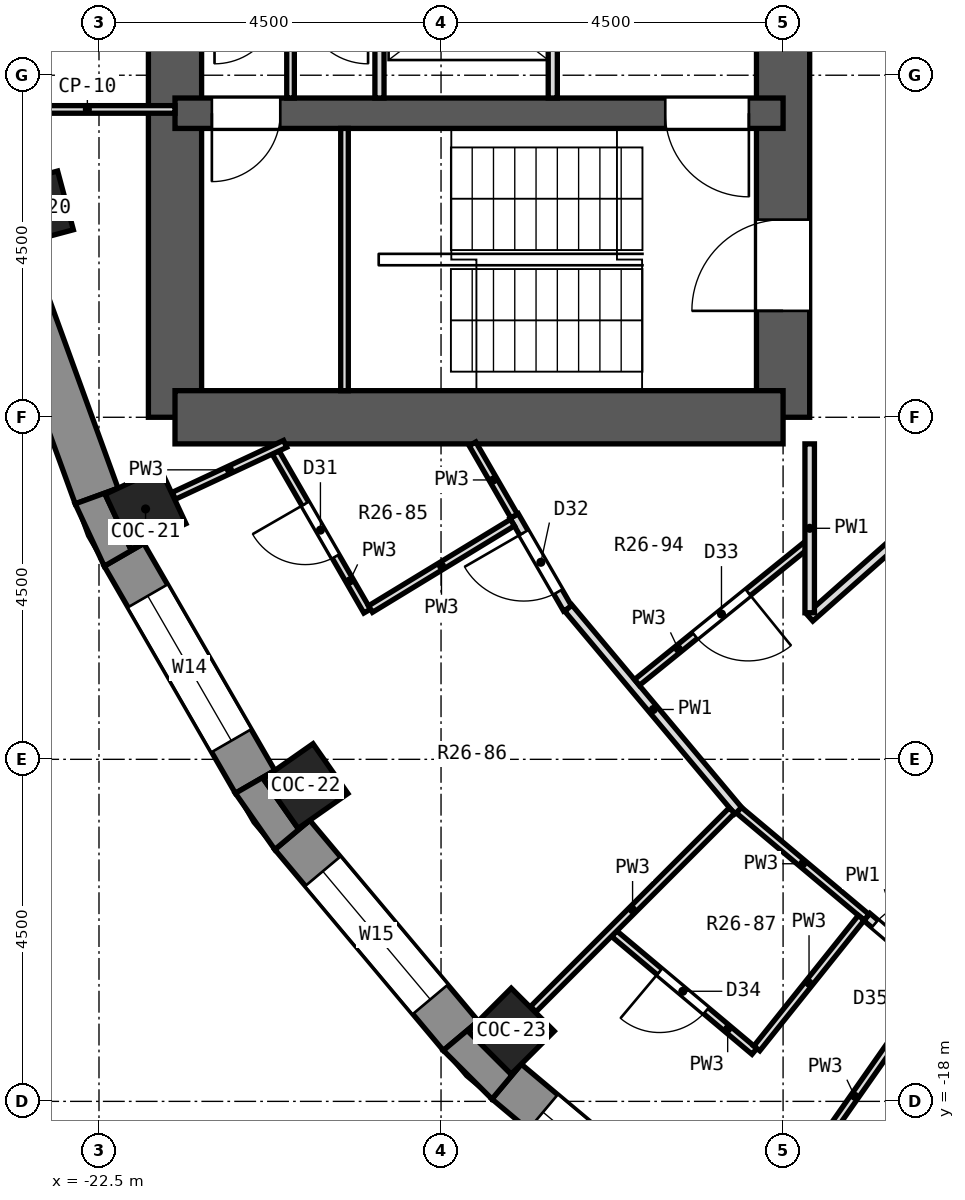
"""IFC4 building model, lengths in metres.
Left out: names, types, materials, properties, quantities, classifications, styles, units other than length and angle.
Written with IfcOpenShell. Run it as: python <this file> out.ifc"""

import sys

from ifc_helpers import new_model, si_unit, direction, frame, frame_2d, origin, origin_2d, place, context, subcontext, project, spatial, polyline, rectangle, outline, extrude, element, fill, save


model = new_model("IFC4")
c1 = context("Model", 3, precision=1e-05, world=origin(), true_north=direction((0.0, 1.0)))
c2 = subcontext(c1, "Body", "Model", "MODEL_VIEW")
j1 = project(units=[si_unit("LENGTHUNIT", "METRE"), si_unit("PLANEANGLEUNIT", "RADIAN")], contexts=[c1])
p1 = place(None, origin())
s1 = spatial("IfcSite", under=j1, at=p1, CompositionType="ELEMENT")
p2 = place(p1, origin())
s2 = spatial("IfcBuilding", under=s1, at=p2, CompositionType="ELEMENT")
p3 = place(p2, frame((0.0, 0.0, 170.7)))
s3 = spatial("IfcBuildingStorey", under=s2, at=p3, CompositionType="ELEMENT", Elevation=170.7)
for number, where, z_axis, x_axis in (
    (1, (-23.327, -6.25, 0.0), (0.0, 0.0, 1.0), (-0.966, -0.259, 0.0)),
    (2, (-21.887, -10.206, 0.0), (0.0, 0.0, 1.0), (-0.906, -0.423, 0.0)),
    (3, (-19.782, -13.852, 0.0), (0.0, 0.0, 1.0), (-0.819, -0.574, 0.0)),
    (4, (-17.077, -17.077, 0.0), (0.0, 0.0, 1.0), (-0.707, -0.707, 0.0)),
):
    element("IfcColumn", number, at=place(p3, frame(where, z_axis=z_axis, x_axis=x_axis)), inside=s3, PredefinedType="COLUMN", context=c2, shape_type="SweptSolid", body=[
        extrude(rectangle(XDim=0.8, YDim=0.8, at=origin_2d()), origin(), (0.0, 0.0, 1.0), 3.3),
    ])
p4 = place(p3, frame((-13.5, -9.0, 0.0), z_axis=(0.0, 0.0, 1.0), x_axis=(0.0, 1.0, 0.0)))
e5 = element("IfcWall", 5, at=p4, inside=s3, PredefinedType="SHEAR", context=c2, shape_type="SweptSolid", body=[
    extrude(rectangle(XDim=18.0, YDim=0.7, at=frame_2d((9.0, 0.0))), origin(), (0.0, 0.0, 1.0), 3.3),
])
p5 = place(p4, frame((15.4, 0.0, 0.0)))
e6 = element("IfcOpeningElement", 6, at=p5, cuts=e5, PredefinedType="OPENING", context=c2, shape_type="SweptSolid", body=[
    extrude(rectangle(XDim=1.2, YDim=2.1, at=frame_2d((0.6, 1.05))), frame((0.0, 0.362, 0.0), z_axis=(0.0, -1.0, 0.0), x_axis=(1.0, 0.0, 0.0)), (0.0, 0.0, 1.0), 0.724),
])
p6 = place(p4, frame((1.4, 0.0, 0.0)))
e7 = element("IfcOpeningElement", 7, at=p6, cuts=e5, PredefinedType="OPENING", context=c2, shape_type="SweptSolid", body=[
    extrude(rectangle(XDim=1.2, YDim=2.1, at=frame_2d((0.6, 1.05))), frame((0.0, 0.362, 0.0), z_axis=(0.0, -1.0, 0.0), x_axis=(1.0, 0.0, 0.0)), (0.0, 0.0, 1.0), 0.724),
])
p7 = place(p4, frame((7.5, 0.0, 0.0)))
e8 = element("IfcOpeningElement", 8, at=p7, cuts=e5, PredefinedType="OPENING", context=c2, shape_type="SweptSolid", body=[
    extrude(rectangle(XDim=3.0, YDim=2.4, at=frame_2d((1.5, 1.2))), frame((0.0, 0.362, 0.0), z_axis=(0.0, -1.0, 0.0), x_axis=(1.0, 0.0, 0.0)), (0.0, 0.0, 1.0), 0.724),
])
p8 = place(p3, frame((-21.5, -9.0, 0.0), z_axis=(0.0, 0.0, 1.0), x_axis=(0.0, 1.0, 0.0)))
e9 = element("IfcWall", 9, at=p8, inside=s3, PredefinedType="SHEAR", context=c2, shape_type="SweptSolid", body=[
    extrude(rectangle(XDim=18.0, YDim=0.7, at=frame_2d((9.0, 0.0))), origin(), (0.0, 0.0, 1.0), 3.3),
])
p9 = place(p8, frame((9.45, 0.0, 0.0)))
e10 = element("IfcOpeningElement", 10, at=p9, cuts=e9, PredefinedType="OPENING", context=c2, shape_type="SweptSolid", body=[
    extrude(rectangle(XDim=0.9, YDim=2.1, at=frame_2d((0.45, 1.05))), frame((0.0, 0.362, 0.0), z_axis=(0.0, -1.0, 0.0), x_axis=(1.0, 0.0, 0.0)), (0.0, 0.0, 1.0), 0.724),
])
p10 = place(p8, frame((7.65, 0.0, 0.0)))
e11 = element("IfcOpeningElement", 11, at=p10, cuts=e9, PredefinedType="OPENING", context=c2, shape_type="SweptSolid", body=[
    extrude(rectangle(XDim=0.9, YDim=2.1, at=frame_2d((0.45, 1.05))), frame((0.0, 0.362, 0.0), z_axis=(0.0, -1.0, 0.0), x_axis=(1.0, 0.0, 0.0)), (0.0, 0.0, 1.0), 0.724),
])
p11 = place(p3, frame((-13.5, -9.0, 0.0), z_axis=(0.0, 0.0, 1.0), x_axis=(-1.0, 0.0, 0.0)))
e12 = element("IfcWall", 12, at=p11, inside=s3, PredefinedType="SHEAR", context=c2, shape_type="SweptSolid", body=[
    extrude(rectangle(XDim=8.0, YDim=0.7, at=frame_2d((4.0, 0.0))), origin(), (0.0, 0.0, 1.0), 3.3),
])
p12 = place(p3, frame((-13.5, -5.0, 0.0), z_axis=(0.0, 0.0, 1.0), x_axis=(-1.0, 0.0, 0.0)))
e13 = element("IfcWall", 13, at=p12, inside=s3, PredefinedType="SHEAR", context=c2, shape_type="SweptSolid", body=[
    extrude(rectangle(XDim=8.0, YDim=0.4, at=frame_2d((4.0, 0.0))), origin(), (0.0, 0.0, 1.0), 3.3),
])
p13 = place(p12, frame((6.615, 0.0, 0.0)))
e14 = element("IfcOpeningElement", 14, at=p13, cuts=e13, PredefinedType="OPENING", context=c2, shape_type="SweptSolid", body=[
    extrude(rectangle(XDim=0.9, YDim=2.1, at=frame_2d((0.45, 1.05))), frame((0.0, 0.212, 0.0), z_axis=(0.0, -1.0, 0.0), x_axis=(1.0, 0.0, 0.0)), (0.0, 0.0, 1.0), 0.424),
])
p14 = place(p12, frame((0.45, 0.0, 0.0)))
e15 = element("IfcOpeningElement", 15, at=p14, cuts=e13, PredefinedType="OPENING", context=c2, shape_type="SweptSolid", body=[
    extrude(rectangle(XDim=1.1, YDim=2.1, at=frame_2d((0.55, 1.05))), frame((0.0, 0.212, 0.0), z_axis=(0.0, -1.0, 0.0), x_axis=(1.0, 0.0, 0.0)), (0.0, 0.0, 1.0), 0.424),
])
p15 = place(p3, frame((-23.711, -6.794, 0.0), z_axis=(0.0, 0.0, 1.0), x_axis=(0.342032843455, -0.93968799822, 0.0)))
e16 = element("IfcWall", 16, at=p15, inside=s3, PredefinedType="SOLIDWALL", context=c2, shape_type="SweptSolid", body=[
    extrude(rectangle(XDim=3.45, YDim=0.6, at=frame_2d((1.725, 0.0))), origin(), (0.0, 0.0, 1.0), 2.85),
])
p16 = place(p3, frame((-22.171, -10.809, 0.0), z_axis=(0.0, 0.0, 1.0), x_axis=(0.499998129301, -0.86602648383, 0.0)))
e17 = element("IfcWall", 17, at=p16, inside=s3, PredefinedType="SOLIDWALL", context=c2, shape_type="SweptSolid", body=[
    extrude(rectangle(XDim=3.45, YDim=0.6, at=frame_2d((1.725, 0.0))), origin(), (0.0, 0.0, 1.0), 2.85),
])
p17 = place(p16, frame((0.625, 0.0, 0.9)))
e18 = element("IfcOpeningElement", 18, at=p17, cuts=e17, PredefinedType="OPENING", context=c2, shape_type="SweptSolid", body=[
    extrude(rectangle(XDim=2.2, YDim=1.8, at=frame_2d((1.1, 0.9))), frame((0.0, 0.312, 0.0), z_axis=(0.0, -1.0, 0.0), x_axis=(1.0, 0.0, 0.0)), (0.0, 0.0, 1.0), 0.624),
])
p18 = place(p3, frame((-19.957, -14.494, 0.0), z_axis=(0.0, 0.0, 1.0), x_axis=(0.642770398358, -0.766058884809, 0.0)))
e19 = element("IfcWall", 19, at=p18, inside=s3, PredefinedType="SOLIDWALL", context=c2, shape_type="SweptSolid", body=[
    extrude(rectangle(XDim=3.449, YDim=0.6, at=frame_2d((1.725, 0.0))), origin(), (0.0, 0.0, 1.0), 2.85),
])
p19 = place(p18, frame((0.625, 0.0, 0.9)))
e20 = element("IfcOpeningElement", 20, at=p19, cuts=e19, PredefinedType="OPENING", context=c2, shape_type="SweptSolid", body=[
    extrude(rectangle(XDim=2.2, YDim=1.8, at=frame_2d((1.1, 0.9))), frame((0.0, 0.312, 0.0), z_axis=(0.0, -1.0, 0.0), x_axis=(1.0, 0.0, 0.0)), (0.0, 0.0, 1.0), 0.624),
])
p20 = place(p3, frame((-17.137, -17.74, 0.0), z_axis=(0.0, 0.0, 1.0), x_axis=(0.766058884809, -0.642770398358, 0.0)))
e21 = element("IfcWall", 21, at=p20, inside=s3, PredefinedType="SOLIDWALL", context=c2, shape_type="SweptSolid", body=[
    extrude(rectangle(XDim=3.449, YDim=0.6, at=frame_2d((1.725, 0.0))), origin(), (0.0, 0.0, 1.0), 2.85),
])
p21 = place(p20, frame((0.625, 0.0, 0.9)))
e22 = element("IfcOpeningElement", 22, at=p21, cuts=e21, PredefinedType="OPENING", context=c2, shape_type="SweptSolid", body=[
    extrude(rectangle(XDim=2.2, YDim=1.8, at=frame_2d((1.1, 0.9))), frame((0.0, 0.312, 0.0), z_axis=(0.0, -1.0, 0.0), x_axis=(1.0, 0.0, 0.0)), (0.0, 0.0, 1.0), 0.624),
])
p22 = place(p3, origin())
e23 = element("IfcWall", 23, at=p22, inside=s3, PredefinedType="SOLIDWALL", context=c2, shape_type="SweptSolid", body=[
    extrude(outline(polyline([(-22.431, -10.959), (-21.911, -10.659), (-22.081, -10.738), (-22.419, -10.013), (-22.249, -9.934), (-22.813, -10.139), (-22.431, -10.959)])), origin(), (0.0, 0.0, 1.0), 2.85),
])
p23 = place(p3, origin())
e24 = element("IfcWall", 24, at=p23, inside=s3, PredefinedType="SOLIDWALL", context=c2, shape_type="SweptSolid", body=[
    extrude(outline(polyline([(-20.706, -13.946), (-20.187, -14.687), (-19.727, -14.302), (-19.881, -14.409), (-20.34, -13.754), (-20.186, -13.646), (-20.706, -13.946)])), origin(), (0.0, 0.0, 1.0), 2.85),
])
p24 = place(p3, origin())
e25 = element("IfcWall", 25, at=p24, inside=s3, PredefinedType="SOLIDWALL", context=c2, shape_type="SweptSolid", body=[
    extrude(outline(polyline([(-17.33, -17.969), (-16.944, -17.51), (-17.077, -17.642), (-17.642, -17.077), (-17.51, -16.944), (-17.969, -17.33), (-17.33, -17.969)])), origin(), (0.0, 0.0, 1.0), 2.85),
])
p25 = place(p3, frame((-20.176, -9.464, 0.0), z_axis=(0.0, 0.0, 1.0), x_axis=(0.499824847066, -0.866126504764, 0.0)))
e26 = element("IfcWall", 26, at=p25, inside=s3, PredefinedType="PARTITIONING", context=c2, shape_type="SweptSolid", body=[
    extrude(rectangle(XDim=2.408, YDim=0.1, at=frame_2d((1.204, 0.0))), origin(), (0.0, 0.0, 1.0), 2.85),
])
p26 = place(p25, frame((0.778, 0.0, 0.0)))
e27 = element("IfcOpeningElement", 27, at=p26, cuts=e26, PredefinedType="OPENING", context=c2, shape_type="SweptSolid", body=[
    extrude(rectangle(XDim=0.8, YDim=2.1, at=frame_2d((0.4, 1.05))), frame((0.0, 0.062, 0.0), z_axis=(0.0, -1.0, 0.0), x_axis=(1.0, 0.0, 0.0)), (0.0, 0.0, 1.0), 0.124),
])
p27 = place(p3, frame((-17.038, -10.299, 0.0), z_axis=(0.0, 0.0, 1.0), x_axis=(0.500147619332, -0.865940158947, 0.0)))
e28 = element("IfcWall", 28, at=p27, inside=s3, PredefinedType="PARTITIONING", context=c2, shape_type="SweptSolid", body=[
    extrude(rectangle(XDim=1.408, YDim=0.125, at=frame_2d((0.704, 0.0))), origin(), (0.0, 0.0, 1.0), 2.85),
])
p28 = place(p27, frame((0.253, 0.0, 0.0)))
e29 = element("IfcOpeningElement", 29, at=p28, cuts=e28, PredefinedType="OPENING", context=c2, shape_type="SweptSolid", body=[
    extrude(rectangle(XDim=0.9, YDim=2.1, at=frame_2d((0.45, 1.05))), frame((0.0, 0.074, 0.0), z_axis=(0.0, -1.0, 0.0), x_axis=(1.0, 0.0, 0.0)), (0.0, 0.0, 1.0), 0.149),
])
p29 = place(p3, frame((-17.586, -9.35, 0.0), z_axis=(0.0, 0.0, 1.0), x_axis=(0.499902521513, -0.866081675701, 0.0)))
e30 = element("IfcWall", 30, at=p29, inside=s3, PredefinedType="PARTITIONING", context=c2, shape_type="SweptSolid", body=[
    extrude(rectangle(XDim=1.095, YDim=0.1, at=frame_2d((0.548, 0.0))), origin(), (0.0, 0.0, 1.0), 2.85),
])
p30 = place(p3, frame((-16.325, -11.511, 0.0), z_axis=(0.0, 0.0, 1.0), x_axis=(0.642416987395, -0.766355279428, 0.0)))
e31 = element("IfcWall", 31, at=p30, inside=s3, PredefinedType="PARTITIONING", context=c2, shape_type="SweptSolid", body=[
    extrude(rectangle(XDim=3.481, YDim=0.125, at=frame_2d((1.74, 0.0))), origin(), (0.0, 0.0, 1.0), 2.85),
])
p31 = place(p3, frame((-12.398, -15.574, 0.0), z_axis=(0.0, 0.0, 1.0), x_axis=(0.763379112729, -0.645950718128, 0.0)))
e32 = element("IfcWall", 32, at=p31, inside=s3, PredefinedType="PARTITIONING", context=c2, shape_type="SweptSolid", body=[
    extrude(rectangle(XDim=1.291, YDim=0.125, at=frame_2d((0.646, 0.0))), origin(), (0.0, 0.0, 1.0), 2.85),
])
p32 = place(p31, frame((0.139, 0.0, 0.0)))
e33 = element("IfcOpeningElement", 33, at=p32, cuts=e32, PredefinedType="OPENING", context=c2, shape_type="SweptSolid", body=[
    extrude(rectangle(XDim=0.9, YDim=2.1, at=frame_2d((0.45, 1.05))), frame((0.0, 0.074, 0.0), z_axis=(0.0, -1.0, 0.0), x_axis=(1.0, 0.0, 0.0)), (0.0, 0.0, 1.0), 0.149),
])
p33 = place(p3, frame((-15.723, -15.793, 0.0), z_axis=(0.0, 0.0, 1.0), x_axis=(0.766024146731, -0.642811797204, 0.0)))
e34 = element("IfcWall", 34, at=p33, inside=s3, PredefinedType="PARTITIONING", context=c2, shape_type="SweptSolid", body=[
    extrude(rectangle(XDim=2.409, YDim=0.1, at=frame_2d((1.205, 0.0))), origin(), (0.0, 0.0, 1.0), 2.85),
])
p34 = place(p33, frame((0.78, 0.0, 0.0)))
e35 = element("IfcOpeningElement", 35, at=p34, cuts=e34, PredefinedType="OPENING", context=c2, shape_type="SweptSolid", body=[
    extrude(rectangle(XDim=0.8, YDim=2.1, at=frame_2d((0.4, 1.05))), frame((0.0, 0.062, 0.0), z_axis=(0.0, -1.0, 0.0), x_axis=(1.0, 0.0, 0.0)), (0.0, 0.0, 1.0), 0.124),
])
p35 = place(p3, frame((-14.081, -14.169, 0.0), z_axis=(0.0, 0.0, 1.0), x_axis=(0.766108401036, -0.642711379907, 0.0)))
e36 = element("IfcWall", 36, at=p35, inside=s3, PredefinedType="PARTITIONING", context=c2, shape_type="SweptSolid", body=[
    extrude(rectangle(XDim=2.192, YDim=0.1, at=frame_2d((1.096, 0.0))), origin(), (0.0, 0.0, 1.0), 2.85),
])
p36 = place(p3, frame((-21.516, -10.033, 0.0), z_axis=(0.0, 0.0, 1.0), x_axis=(0.906156125341, 0.422943349051, 0.0)))
e37 = element("IfcWall", 37, at=p36, inside=s3, PredefinedType="PARTITIONING", context=c2, shape_type="SweptSolid", body=[
    extrude(rectangle(XDim=1.616, YDim=0.1, at=frame_2d((0.808, 0.0))), origin(), (0.0, 0.0, 1.0), 2.85),
])
p37 = place(p3, frame((-18.928, -11.523, 0.0), z_axis=(0.0, 0.0, 1.0), x_axis=(0.854045436393, 0.520198416545, 0.0)))
e38 = element("IfcWall", 38, at=p37, inside=s3, PredefinedType="PARTITIONING", context=c2, shape_type="SweptSolid", body=[
    extrude(rectangle(XDim=2.187, YDim=0.1, at=frame_2d((1.093, 0.0))), origin(), (0.0, 0.0, 1.0), 2.85),
])
p38 = place(p3, frame((-15.422, -12.489, 0.0), z_axis=(0.0, 0.0, 1.0), x_axis=(0.777201155745, 0.629252225669, 0.0)))
e39 = element("IfcWall", 39, at=p38, inside=s3, PredefinedType="PARTITIONING", context=c2, shape_type="SweptSolid", body=[
    extrude(rectangle(XDim=2.861, YDim=0.1, at=frame_2d((1.431, 0.0))), origin(), (0.0, 0.0, 1.0), 2.85),
])
p39 = place(p38, frame((0.981, 0.0, 0.0)))
e40 = element("IfcOpeningElement", 40, at=p39, cuts=e39, PredefinedType="OPENING", context=c2, shape_type="SweptSolid", body=[
    extrude(rectangle(XDim=0.9, YDim=2.1, at=frame_2d((0.45, 1.05))), frame((0.0, 0.062, 0.0), z_axis=(0.0, -1.0, 0.0), x_axis=(1.0, 0.0, 0.0)), (0.0, 0.0, 1.0), 0.124),
])
p40 = place(p3, frame((-13.15, -11.634, 0.0), z_axis=(0.0, 0.0, 1.0), x_axis=(0.748975424904, 0.662597776098, 0.0)))
e41 = element("IfcWall", 41, at=p40, inside=s3, PredefinedType="PARTITIONING", context=c2, shape_type="SweptSolid", body=[
    extrude(rectangle(XDim=1.984, YDim=0.125, at=frame_2d((0.992, 0.0))), origin(), (0.0, 0.0, 1.0), 2.85),
])
p41 = place(p3, frame((-16.787, -16.787, 0.0), z_axis=(0.0, 0.0, 1.0), x_axis=(0.707106781187, 0.707106781187, 0.0)))
e42 = element("IfcWall", 42, at=p41, inside=s3, PredefinedType="PARTITIONING", context=c2, shape_type="SweptSolid", body=[
    extrude(rectangle(XDim=3.696, YDim=0.1, at=frame_2d((1.848, 0.0))), origin(), (0.0, 0.0, 1.0), 2.85),
])
p42 = place(p3, frame((-13.846, -17.303, 0.0), z_axis=(0.0, 0.0, 1.0), x_axis=(0.624722111344, 0.780847157642, 0.0)))
e43 = element("IfcWall", 43, at=p42, inside=s3, PredefinedType="PARTITIONING", context=c2, shape_type="SweptSolid", body=[
    extrude(rectangle(XDim=2.2, YDim=0.1, at=frame_2d((1.1, 0.0))), origin(), (0.0, 0.0, 1.0), 2.85),
])
p43 = place(p3, frame((-13.617, -19.447, 0.0), z_axis=(0.0, 0.0, 1.0), x_axis=(0.573515531974, 0.819194686619, 0.0)))
e44 = element("IfcWall", 44, at=p43, inside=s3, PredefinedType="PARTITIONING", context=c2, shape_type="SweptSolid", body=[
    extrude(rectangle(XDim=3.697, YDim=0.1, at=frame_2d((1.848, 0.0))), origin(), (0.0, 0.0, 1.0), 2.85),
])
p44 = place(p3, frame((-13.15, -11.572, 0.0), z_axis=(0.0, 0.0, 1.0), x_axis=(0.0, 1.0, 0.0)))
e45 = element("IfcWall", 45, at=p44, inside=s3, PredefinedType="PARTITIONING", context=c2, shape_type="SweptSolid", body=[
    extrude(rectangle(XDim=2.221, YDim=0.125, at=frame_2d((1.111, 0.0))), origin(), (0.0, 0.0, 1.0), 2.85),
])
p45 = place(p3, frame((-21.5, -4.95, 0.0), z_axis=(0.0, 0.0, 1.0), x_axis=(-1.0, 0.0, 0.0)))
e46 = element("IfcWall", 46, at=p45, inside=s3, PredefinedType="PARTITIONING", context=c2, shape_type="SweptSolid", body=[
    extrude(rectangle(XDim=2.307, YDim=0.1, at=frame_2d((1.153, 0.0))), origin(), (0.0, 0.0, 1.0), 2.85),
])
p46 = place(p3, frame((-16.53, -4.8, 0.0), z_axis=(0.0, 0.0, 1.0), x_axis=(0.0, 1.0, 0.0)))
e47 = element("IfcWall", 47, at=p46, inside=s3, PredefinedType="PARTITIONING", context=c2, shape_type="SweptSolid", body=[
    extrude(rectangle(XDim=2.6, YDim=0.12, at=frame_2d((1.3, 0.0))), origin(), (0.0, 0.0, 1.0), 2.85),
])
p47 = place(p46, frame((0.75, 0.0, 0.0)))
e48 = element("IfcOpeningElement", 48, at=p47, cuts=e47, PredefinedType="OPENING", context=c2, shape_type="SweptSolid", body=[
    extrude(rectangle(XDim=1.1, YDim=2.1, at=frame_2d((0.55, 1.05))), frame((0.0, 0.072, 0.0), z_axis=(0.0, -1.0, 0.0), x_axis=(1.0, 0.0, 0.0)), (0.0, 0.0, 1.0), 0.144),
])
p48 = place(p3, frame((-18.81, -4.8, 0.0), z_axis=(0.0, 0.0, 1.0), x_axis=(0.0, 1.0, 0.0)))
e49 = element("IfcWall", 49, at=p48, inside=s3, PredefinedType="PARTITIONING", context=c2, shape_type="SweptSolid", body=[
    extrude(rectangle(XDim=2.6, YDim=0.12, at=frame_2d((1.3, 0.0))), origin(), (0.0, 0.0, 1.0), 2.85),
])
p49 = place(p3, frame((-19.98, -4.8, 0.0), z_axis=(0.0, 0.0, 1.0), x_axis=(0.0, 1.0, 0.0)))
e50 = element("IfcWall", 50, at=p49, inside=s3, PredefinedType="PARTITIONING", context=c2, shape_type="SweptSolid", body=[
    extrude(rectangle(XDim=2.6, YDim=0.1, at=frame_2d((1.3, 0.0))), origin(), (0.0, 0.0, 1.0), 2.85),
])
p50 = place(p3, frame((-19.27, -8.65, 0.0), z_axis=(0.0, 0.0, 1.0), x_axis=(0.0, 1.0, 0.0)))
e51 = element("IfcWall", 51, at=p50, inside=s3, PredefinedType="PARTITIONING", context=c2, shape_type="SweptSolid", body=[
    extrude(rectangle(XDim=3.45, YDim=0.1, at=frame_2d((1.725, 0.0))), origin(), (0.0, 0.0, 1.0), 2.85),
])
p51 = place(p17, origin())
e52 = element("IfcWindow", 52, at=p51, inside=s3, PartitioningType="SINGLE_PANEL", PredefinedType="WINDOW", context=c2, shape_type="SweptSolid", body=[
    extrude(rectangle(XDim=2.2, YDim=1.8, at=frame_2d((1.1, 0.9))), frame((0.0, 0.18, 0.0), z_axis=(0.0, -1.0, 0.0), x_axis=(1.0, 0.0, 0.0)), (0.0, 0.0, 1.0), 0.06),
])
fill(e18, e52)
p52 = place(p19, origin())
e53 = element("IfcWindow", 53, at=p52, inside=s3, PartitioningType="SINGLE_PANEL", PredefinedType="WINDOW", context=c2, shape_type="SweptSolid", body=[
    extrude(rectangle(XDim=2.2, YDim=1.8, at=frame_2d((1.1, 0.9))), frame((0.0, 0.18, 0.0), z_axis=(0.0, -1.0, 0.0), x_axis=(1.0, 0.0, 0.0)), (0.0, 0.0, 1.0), 0.06),
])
fill(e20, e53)
p53 = place(p21, origin())
e54 = element("IfcWindow", 54, at=p53, inside=s3, PartitioningType="SINGLE_PANEL", PredefinedType="WINDOW", context=c2, shape_type="SweptSolid", body=[
    extrude(rectangle(XDim=2.2, YDim=1.8, at=frame_2d((1.1, 0.9))), frame((0.0, 0.18, 0.0), z_axis=(0.0, -1.0, 0.0), x_axis=(1.0, 0.0, 0.0)), (0.0, 0.0, 1.0), 0.06),
])
fill(e22, e54)
p54 = place(p26, frame((0.8, 0.0, 0.0), z_axis=(0.0, 0.0, 1.0), x_axis=(-1.0, 0.0, 0.0)))
e55 = element("IfcDoor", 55, at=p54, inside=s3, OperationType="SINGLE_SWING_RIGHT", PredefinedType="DOOR", context=c2, shape_type="SweptSolid", body=[
    extrude(rectangle(XDim=0.8, YDim=2.1, at=frame_2d((0.4, 1.05))), frame((0.0, 0.025, 0.0), z_axis=(0.0, -1.0, 0.0), x_axis=(1.0, 0.0, 0.0)), (0.0, 0.0, 1.0), 0.05),
])
fill(e27, e55)
p55 = place(p28, frame((0.9, 0.0, 0.0), z_axis=(0.0, 0.0, 1.0), x_axis=(-1.0, 0.0, 0.0)))
e56 = element("IfcDoor", 56, at=p55, inside=s3, OperationType="SINGLE_SWING_RIGHT", PredefinedType="DOOR", context=c2, shape_type="SweptSolid", body=[
    extrude(rectangle(XDim=0.9, YDim=2.1, at=frame_2d((0.45, 1.05))), frame((0.0, 0.025, 0.0), z_axis=(0.0, -1.0, 0.0), x_axis=(1.0, 0.0, 0.0)), (0.0, 0.0, 1.0), 0.05),
])
fill(e29, e56)
p56 = place(p39, frame((0.9, 0.0, 0.0), z_axis=(0.0, 0.0, 1.0), x_axis=(-1.0, 0.0, 0.0)))
e57 = element("IfcDoor", 57, at=p56, inside=s3, OperationType="SINGLE_SWING_LEFT", PredefinedType="DOOR", context=c2, shape_type="SweptSolid", body=[
    extrude(rectangle(XDim=0.9, YDim=2.1, at=frame_2d((0.45, 1.05))), frame((0.0, 0.025, 0.0), z_axis=(0.0, -1.0, 0.0), x_axis=(1.0, 0.0, 0.0)), (0.0, 0.0, 1.0), 0.05),
])
fill(e40, e57)
p57 = place(p34, frame((0.8, 0.0, 0.0), z_axis=(0.0, 0.0, 1.0), x_axis=(-1.0, 0.0, 0.0)))
e58 = element("IfcDoor", 58, at=p57, inside=s3, OperationType="SINGLE_SWING_RIGHT", PredefinedType="DOOR", context=c2, shape_type="SweptSolid", body=[
    extrude(rectangle(XDim=0.8, YDim=2.1, at=frame_2d((0.4, 1.05))), frame((0.0, 0.025, 0.0), z_axis=(0.0, -1.0, 0.0), x_axis=(1.0, 0.0, 0.0)), (0.0, 0.0, 1.0), 0.05),
])
fill(e35, e58)
p58 = place(p32, origin())
e59 = element("IfcDoor", 59, at=p58, inside=s3, OperationType="SINGLE_SWING_RIGHT", PredefinedType="DOOR", context=c2, shape_type="SweptSolid", body=[
    extrude(rectangle(XDim=0.9, YDim=2.1, at=frame_2d((0.45, 1.05))), frame((0.0, 0.025, 0.0), z_axis=(0.0, -1.0, 0.0), x_axis=(1.0, 0.0, 0.0)), (0.0, 0.0, 1.0), 0.05),
])
fill(e33, e59)
p59 = place(p13, origin())
e60 = element("IfcDoor", 60, at=p59, inside=s3, OperationType="SINGLE_SWING_RIGHT", PredefinedType="DOOR", context=c2, shape_type="SweptSolid", body=[
    extrude(rectangle(XDim=0.9, YDim=2.1, at=frame_2d((0.45, 1.05))), frame((0.0, 0.025, 0.0), z_axis=(0.0, -1.0, 0.0), x_axis=(1.0, 0.0, 0.0)), (0.0, 0.0, 1.0), 0.05),
])
fill(e14, e60)
p60 = place(p14, origin())
e61 = element("IfcDoor", 61, at=p60, inside=s3, OperationType="SINGLE_SWING_LEFT", PredefinedType="DOOR", context=c2, shape_type="SweptSolid", body=[
    extrude(rectangle(XDim=1.1, YDim=2.1, at=frame_2d((0.55, 1.05))), frame((0.0, 0.025, 0.0), z_axis=(0.0, -1.0, 0.0), x_axis=(1.0, 0.0, 0.0)), (0.0, 0.0, 1.0), 0.05),
])
fill(e15, e61)
p61 = place(p6, origin())
e62 = element("IfcDoor", 62, at=p61, inside=s3, OperationType="SINGLE_SWING_LEFT", PredefinedType="DOOR", context=c2, shape_type="SweptSolid", body=[
    extrude(rectangle(XDim=1.2, YDim=2.1, at=frame_2d((0.6, 1.05))), frame((0.0, 0.025, 0.0), z_axis=(0.0, -1.0, 0.0), x_axis=(1.0, 0.0, 0.0)), (0.0, 0.0, 1.0), 0.05),
])
fill(e7, e62)
save(model, sys.argv[1])
